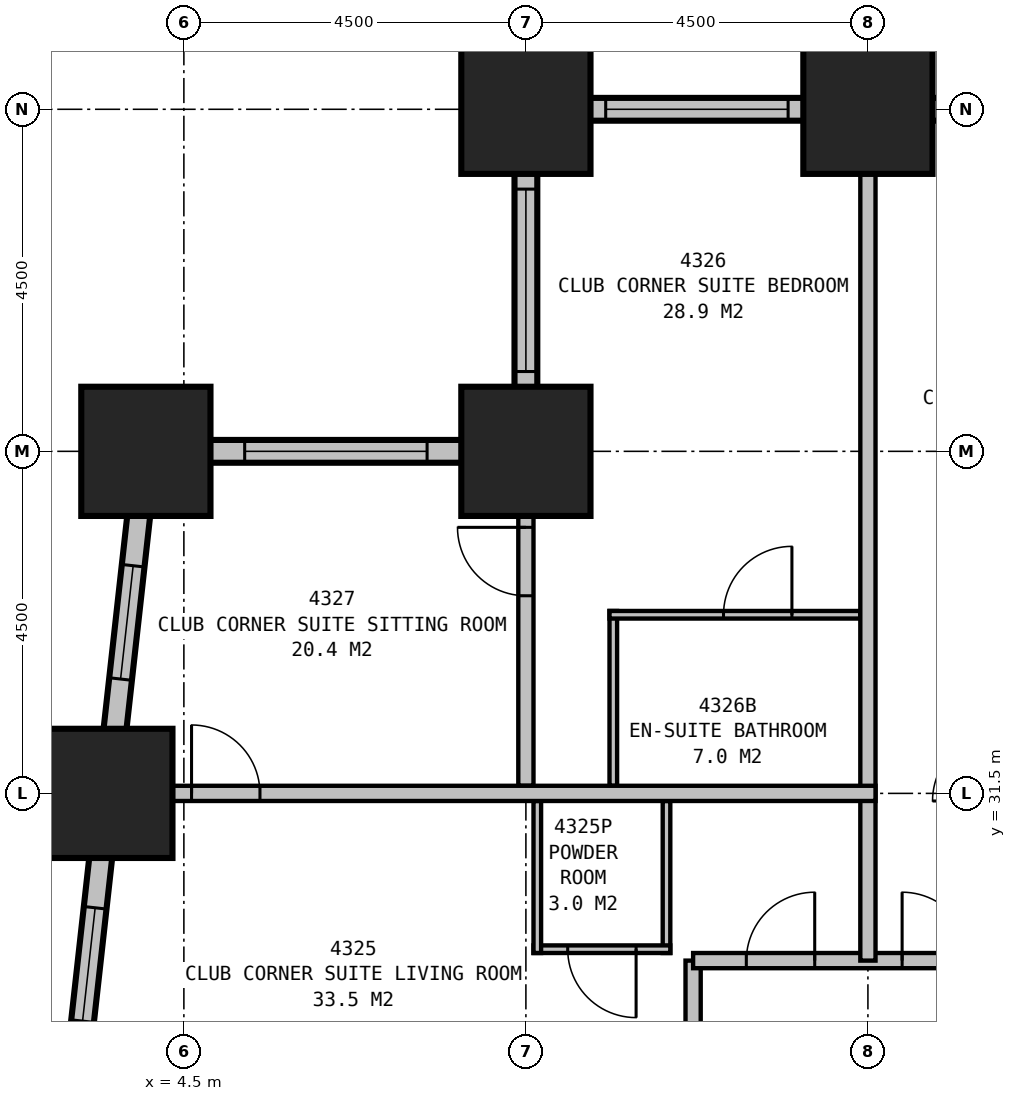
"""IFC4 building model, lengths in metres.
Left out: names, types, materials, properties, quantities, classifications, styles, units other than length and angle.
Written with IfcOpenShell. Run it as: python <this file> out.ifc"""

import sys

from ifc_helpers import new_model, si_unit, direction, frame, frame_2d, origin, origin_2d, place, context, subcontext, project, spatial, rectangle, extrude, element, fill, save


model = new_model("IFC4")
c1 = context("Model", 3, precision=1e-05, world=origin(), true_north=direction((0.0, 1.0)))
c2 = subcontext(c1, "Body", "Model", "MODEL_VIEW")
j1 = project(units=[si_unit("LENGTHUNIT", "METRE"), si_unit("PLANEANGLEUNIT", "RADIAN")], contexts=[c1])
p1 = place(None, origin())
s1 = spatial("IfcSite", under=j1, at=p1, CompositionType="ELEMENT")
p2 = place(p1, origin())
s2 = spatial("IfcBuilding", under=s1, at=p2, CompositionType="ELEMENT")
p3 = place(p2, frame((0.0, 0.0, 169.4)))
s3 = spatial("IfcBuildingStorey", under=s2, at=p3, CompositionType="ELEMENT", Elevation=169.4)
for number, where, z_axis, x_axis in (
    (1, (13.5, 40.5, 0.0), (0.0, 0.0, 1.0), (1.0, 0.0, 0.0)),
    (2, (9.0, 40.5, 0.0), (0.0, 0.0, 1.0), (1.0, 0.0, 0.0)),
    (3, (9.0, 36.0, 0.0), (0.0, 0.0, 1.0), (1.0, 0.0, 0.0)),
    (4, (4.0, 36.0, 0.0), (0.0, 0.0, 1.0), (1.0, 0.0, 0.0)),
    (5, (3.5, 31.5, 0.0), (0.0, 0.0, 1.0), (1.0, 0.0, 0.0)),
):
    element("IfcColumn", number, at=place(p3, frame(where, z_axis=z_axis, x_axis=x_axis)), inside=s3, PredefinedType="COLUMN", context=c2, shape_type="SweptSolid", body=[
        extrude(rectangle(XDim=1.7, YDim=1.7, at=origin_2d()), origin(), (0.0, 0.0, 1.0), 3.5),
    ])
p4 = place(p3, frame((40.65, 40.5, 0.0), z_axis=(0.0, 0.0, 1.0), x_axis=(-1.0, 0.0, 0.0)))
e6 = element("IfcWall", 6, at=p4, inside=s3, PredefinedType="STANDARD", context=c2, shape_type="SweptSolid", body=[
    extrude(rectangle(XDim=31.8, YDim=0.3, at=frame_2d((15.9, 0.0))), origin(), (0.0, 0.0, 1.0), 2.25),
])
p5 = place(p4, frame((1.2, 0.0, 0.5)))
e7 = element("IfcOpeningElement", 7, at=p5, cuts=e6, PredefinedType="OPENING", context=c2, shape_type="SweptSolid", body=[
    extrude(rectangle(XDim=2.4, YDim=1.6, at=frame_2d((1.2, 0.8))), frame((0.0, 0.16, 0.0), z_axis=(0.0, -1.0, 0.0), x_axis=(1.0, 0.0, 0.0)), (0.0, 0.0, 1.0), 0.32),
])
p6 = place(p4, frame((5.7, 0.0, 0.5)))
e8 = element("IfcOpeningElement", 8, at=p6, cuts=e6, PredefinedType="OPENING", context=c2, shape_type="SweptSolid", body=[
    extrude(rectangle(XDim=2.4, YDim=1.6, at=frame_2d((1.2, 0.8))), frame((0.0, 0.16, 0.0), z_axis=(0.0, -1.0, 0.0), x_axis=(1.0, 0.0, 0.0)), (0.0, 0.0, 1.0), 0.32),
])
p7 = place(p4, frame((10.2, 0.0, 0.5)))
e9 = element("IfcOpeningElement", 9, at=p7, cuts=e6, PredefinedType="OPENING", context=c2, shape_type="SweptSolid", body=[
    extrude(rectangle(XDim=2.4, YDim=1.6, at=frame_2d((1.2, 0.8))), frame((0.0, 0.16, 0.0), z_axis=(0.0, -1.0, 0.0), x_axis=(1.0, 0.0, 0.0)), (0.0, 0.0, 1.0), 0.32),
])
p8 = place(p4, frame((14.7, 0.0, 0.5)))
e10 = element("IfcOpeningElement", 10, at=p8, cuts=e6, PredefinedType="OPENING", context=c2, shape_type="SweptSolid", body=[
    extrude(rectangle(XDim=2.4, YDim=1.6, at=frame_2d((1.2, 0.8))), frame((0.0, 0.16, 0.0), z_axis=(0.0, -1.0, 0.0), x_axis=(1.0, 0.0, 0.0)), (0.0, 0.0, 1.0), 0.32),
])
p9 = place(p4, frame((19.2, 0.0, 0.5)))
e11 = element("IfcOpeningElement", 11, at=p9, cuts=e6, PredefinedType="OPENING", context=c2, shape_type="SweptSolid", body=[
    extrude(rectangle(XDim=2.4, YDim=1.6, at=frame_2d((1.2, 0.8))), frame((0.0, 0.16, 0.0), z_axis=(0.0, -1.0, 0.0), x_axis=(1.0, 0.0, 0.0)), (0.0, 0.0, 1.0), 0.32),
])
p10 = place(p4, frame((23.7, 0.0, 0.5)))
e12 = element("IfcOpeningElement", 12, at=p10, cuts=e6, PredefinedType="OPENING", context=c2, shape_type="SweptSolid", body=[
    extrude(rectangle(XDim=2.4, YDim=1.6, at=frame_2d((1.2, 0.8))), frame((0.0, 0.16, 0.0), z_axis=(0.0, -1.0, 0.0), x_axis=(1.0, 0.0, 0.0)), (0.0, 0.0, 1.0), 0.32),
])
p11 = place(p4, frame((28.2, 0.0, 0.5)))
e13 = element("IfcOpeningElement", 13, at=p11, cuts=e6, PredefinedType="OPENING", context=c2, shape_type="SweptSolid", body=[
    extrude(rectangle(XDim=2.4, YDim=1.6, at=frame_2d((1.2, 0.8))), frame((0.0, 0.16, 0.0), z_axis=(0.0, -1.0, 0.0), x_axis=(1.0, 0.0, 0.0)), (0.0, 0.0, 1.0), 0.32),
])
p12 = place(p3, frame((9.0, 40.65, 0.0), z_axis=(0.0, 0.0, 1.0), x_axis=(0.0, -1.0, 0.0)))
e14 = element("IfcWall", 14, at=p12, inside=s3, PredefinedType="STANDARD", context=c2, shape_type="SweptSolid", body=[
    extrude(rectangle(XDim=4.8, YDim=0.3, at=frame_2d((2.4, 0.0))), origin(), (0.0, 0.0, 1.0), 2.25),
])
p13 = place(p12, frame((1.2, 0.0, 0.5)))
e15 = element("IfcOpeningElement", 15, at=p13, cuts=e14, PredefinedType="OPENING", context=c2, shape_type="SweptSolid", body=[
    extrude(rectangle(XDim=2.4, YDim=1.6, at=frame_2d((1.2, 0.8))), frame((0.0, 0.16, 0.0), z_axis=(0.0, -1.0, 0.0), x_axis=(1.0, 0.0, 0.0)), (0.0, 0.0, 1.0), 0.32),
])
p14 = place(p3, frame((9.15, 36.0, 0.0), z_axis=(0.0, 0.0, 1.0), x_axis=(-1.0, 0.0, 0.0)))
e16 = element("IfcWall", 16, at=p14, inside=s3, PredefinedType="STANDARD", context=c2, shape_type="SweptSolid", body=[
    extrude(rectangle(XDim=5.3, YDim=0.3, at=frame_2d((2.65, 0.0))), origin(), (0.0, 0.0, 1.0), 2.25),
])
p15 = place(p14, frame((1.45, 0.0, 0.5)))
e17 = element("IfcOpeningElement", 17, at=p15, cuts=e16, PredefinedType="OPENING", context=c2, shape_type="SweptSolid", body=[
    extrude(rectangle(XDim=2.4, YDim=1.6, at=frame_2d((1.2, 0.8))), frame((0.0, 0.16, 0.0), z_axis=(0.0, -1.0, 0.0), x_axis=(1.0, 0.0, 0.0)), (0.0, 0.0, 1.0), 0.32),
])
p16 = place(p3, frame((4.017, 36.149, 0.0), z_axis=(0.0, 0.0, 1.0), x_axis=(-0.110433862387, -0.993883475081, 0.0)))
e18 = element("IfcWall", 18, at=p16, inside=s3, PredefinedType="STANDARD", context=c2, shape_type="SweptSolid", body=[
    extrude(rectangle(XDim=22.939, YDim=0.3, at=frame_2d((11.469, 0.0))), origin(), (0.0, 0.0, 1.0), 2.25),
])
p17 = place(p16, frame((1.664, 0.0, 0.5)))
e19 = element("IfcOpeningElement", 19, at=p17, cuts=e18, PredefinedType="OPENING", context=c2, shape_type="SweptSolid", body=[
    extrude(rectangle(XDim=1.5, YDim=1.6, at=frame_2d((0.75, 0.8))), frame((0.0, 0.16, 0.0), z_axis=(0.0, -1.0, 0.0), x_axis=(1.0, 0.0, 0.0)), (0.0, 0.0, 1.0), 0.32),
])
p18 = place(p16, frame((6.192, 0.0, 0.5)))
e20 = element("IfcOpeningElement", 20, at=p18, cuts=e18, PredefinedType="OPENING", context=c2, shape_type="SweptSolid", body=[
    extrude(rectangle(XDim=1.5, YDim=1.6, at=frame_2d((0.75, 0.8))), frame((0.0, 0.16, 0.0), z_axis=(0.0, -1.0, 0.0), x_axis=(1.0, 0.0, 0.0)), (0.0, 0.0, 1.0), 0.32),
])
p19 = place(p16, frame((10.719, 0.0, 0.5)))
e21 = element("IfcOpeningElement", 21, at=p19, cuts=e18, PredefinedType="OPENING", context=c2, shape_type="SweptSolid", body=[
    extrude(rectangle(XDim=1.5, YDim=1.6, at=frame_2d((0.75, 0.8))), frame((0.0, 0.16, 0.0), z_axis=(0.0, -1.0, 0.0), x_axis=(1.0, 0.0, 0.0)), (0.0, 0.0, 1.0), 0.32),
])
p20 = place(p16, frame((15.247, 0.0, 0.5)))
e22 = element("IfcOpeningElement", 22, at=p20, cuts=e18, PredefinedType="OPENING", context=c2, shape_type="SweptSolid", body=[
    extrude(rectangle(XDim=1.5, YDim=1.6, at=frame_2d((0.75, 0.8))), frame((0.0, 0.16, 0.0), z_axis=(0.0, -1.0, 0.0), x_axis=(1.0, 0.0, 0.0)), (0.0, 0.0, 1.0), 0.32),
])
p21 = place(p16, frame((19.775, 0.0, 0.5)))
e23 = element("IfcOpeningElement", 23, at=p21, cuts=e18, PredefinedType="OPENING", context=c2, shape_type="SweptSolid", body=[
    extrude(rectangle(XDim=1.5, YDim=1.6, at=frame_2d((0.75, 0.8))), frame((0.0, 0.16, 0.0), z_axis=(0.0, -1.0, 0.0), x_axis=(1.0, 0.0, 0.0)), (0.0, 0.0, 1.0), 0.32),
])
p22 = place(p3, frame((11.2, 29.3, 0.0), z_axis=(0.0, 0.0, 1.0), x_axis=(1.0, 0.0, 0.0)))
e24 = element("IfcWall", 24, at=p22, inside=s3, PredefinedType="PARTITIONING", context=c2, shape_type="SweptSolid", body=[
    extrude(rectangle(XDim=27.1, YDim=0.2, at=frame_2d((13.55, 0.0))), origin(), (0.0, 0.0, 1.0), 3.25),
])
p23 = place(p22, frame((2.75, 0.0, 0.0)))
e25 = element("IfcOpeningElement", 25, at=p23, cuts=e24, PredefinedType="OPENING", context=c2, shape_type="SweptSolid", body=[
    extrude(rectangle(XDim=0.9, YDim=2.1, at=frame_2d((0.45, 1.05))), frame((0.0, 0.11, 0.0), z_axis=(0.0, -1.0, 0.0), x_axis=(1.0, 0.0, 0.0)), (0.0, 0.0, 1.0), 0.22),
])
p24 = place(p22, frame((9.55, 0.0, 0.0)))
e26 = element("IfcOpeningElement", 26, at=p24, cuts=e24, PredefinedType="OPENING", context=c2, shape_type="SweptSolid", body=[
    extrude(rectangle(XDim=0.9, YDim=2.1, at=frame_2d((0.45, 1.05))), frame((0.0, 0.11, 0.0), z_axis=(0.0, -1.0, 0.0), x_axis=(1.0, 0.0, 0.0)), (0.0, 0.0, 1.0), 0.22),
])
p25 = place(p22, frame((16.25, 0.0, 0.0)))
e27 = element("IfcOpeningElement", 27, at=p25, cuts=e24, PredefinedType="OPENING", context=c2, shape_type="SweptSolid", body=[
    extrude(rectangle(XDim=0.9, YDim=2.1, at=frame_2d((0.45, 1.05))), frame((0.0, 0.11, 0.0), z_axis=(0.0, -1.0, 0.0), x_axis=(1.0, 0.0, 0.0)), (0.0, 0.0, 1.0), 0.22),
])
p26 = place(p22, frame((20.75, 0.0, 0.0)))
e28 = element("IfcOpeningElement", 28, at=p26, cuts=e24, PredefinedType="OPENING", context=c2, shape_type="SweptSolid", body=[
    extrude(rectangle(XDim=0.9, YDim=2.1, at=frame_2d((0.45, 1.05))), frame((0.0, 0.11, 0.0), z_axis=(0.0, -1.0, 0.0), x_axis=(1.0, 0.0, 0.0)), (0.0, 0.0, 1.0), 0.22),
])
p27 = place(p22, frame((25.5, 0.0, 0.0)))
e29 = element("IfcOpeningElement", 29, at=p27, cuts=e24, PredefinedType="OPENING", context=c2, shape_type="SweptSolid", body=[
    extrude(rectangle(XDim=0.9, YDim=2.1, at=frame_2d((0.45, 1.05))), frame((0.0, 0.11, 0.0), z_axis=(0.0, -1.0, 0.0), x_axis=(1.0, 0.0, 0.0)), (0.0, 0.0, 1.0), 0.22),
])
p28 = place(p22, frame((0.7, 0.0, 0.0)))
e30 = element("IfcOpeningElement", 30, at=p28, cuts=e24, PredefinedType="OPENING", context=c2, shape_type="SweptSolid", body=[
    extrude(rectangle(XDim=0.9, YDim=2.1, at=frame_2d((0.45, 1.05))), frame((0.0, 0.11, 0.0), z_axis=(0.0, -1.0, 0.0), x_axis=(1.0, 0.0, 0.0)), (0.0, 0.0, 1.0), 0.22),
])
p29 = place(p3, frame((11.2, 10.6, 0.0), z_axis=(0.0, 0.0, 1.0), x_axis=(0.0, 1.0, 0.0)))
e31 = element("IfcWall", 31, at=p29, inside=s3, PredefinedType="PARTITIONING", context=c2, shape_type="SweptSolid", body=[
    extrude(rectangle(XDim=18.7, YDim=0.2, at=frame_2d((9.35, 0.0))), origin(), (0.0, 0.0, 1.0), 3.25),
])
p30 = place(p29, frame((6.05, 0.0, 0.0)))
e32 = element("IfcOpeningElement", 32, at=p30, cuts=e31, PredefinedType="OPENING", context=c2, shape_type="SweptSolid", body=[
    extrude(rectangle(XDim=0.9, YDim=2.1, at=frame_2d((0.45, 1.05))), frame((0.0, 0.11, 0.0), z_axis=(0.0, -1.0, 0.0), x_axis=(1.0, 0.0, 0.0)), (0.0, 0.0, 1.0), 0.22),
])
p31 = place(p29, frame((10.55, 0.0, 0.0)))
e33 = element("IfcOpeningElement", 33, at=p31, cuts=e31, PredefinedType="OPENING", context=c2, shape_type="SweptSolid", body=[
    extrude(rectangle(XDim=0.9, YDim=2.1, at=frame_2d((0.45, 1.05))), frame((0.0, 0.11, 0.0), z_axis=(0.0, -1.0, 0.0), x_axis=(1.0, 0.0, 0.0)), (0.0, 0.0, 1.0), 0.22),
])
p32 = place(p29, frame((14.65, 0.0, 0.0)))
e34 = element("IfcOpeningElement", 34, at=p32, cuts=e31, PredefinedType="OPENING", context=c2, shape_type="SweptSolid", body=[
    extrude(rectangle(XDim=1.0, YDim=2.1, at=frame_2d((0.5, 1.05))), frame((0.0, 0.11, 0.0), z_axis=(0.0, -1.0, 0.0), x_axis=(1.0, 0.0, 0.0)), (0.0, 0.0, 1.0), 0.22),
])
p33 = place(p3, frame((13.5, 29.3, 0.0), z_axis=(0.0, 0.0, 1.0), x_axis=(0.0, 1.0, 0.0)))
e35 = element("IfcWall", 35, at=p33, inside=s3, PredefinedType="PARTITIONING", context=c2, shape_type="SweptSolid", body=[
    extrude(rectangle(XDim=11.2, YDim=0.2, at=frame_2d((5.6, 0.0))), origin(), (0.0, 0.0, 1.0), 2.25),
])
p34 = place(p3, frame((13.6, 31.5, 0.0), z_axis=(0.0, 0.0, 1.0), x_axis=(-1.0, 0.0, 0.0)))
e36 = element("IfcWall", 36, at=p34, inside=s3, PredefinedType="PARTITIONING", context=c2, shape_type="SweptSolid", body=[
    extrude(rectangle(XDim=10.099, YDim=0.2, at=frame_2d((5.05, 0.0))), origin(), (0.0, 0.0, 1.0), 3.25),
])
p35 = place(p34, frame((8.999, 0.0, 0.0), z_axis=(0.0, 0.0, 1.0), x_axis=(-1.0, 0.0, 0.0)))
e37 = element("IfcOpeningElement", 37, at=p35, cuts=e36, PredefinedType="OPENING", context=c2, shape_type="SweptSolid", body=[
    extrude(rectangle(XDim=0.9, YDim=2.1, at=frame_2d((0.45, 1.05))), frame((0.0, 0.11, 0.0), z_axis=(0.0, -1.0, 0.0), x_axis=(1.0, 0.0, 0.0)), (0.0, 0.0, 1.0), 0.22),
])
p36 = place(p3, frame((9.15, 31.4, 0.0), z_axis=(0.0, 0.0, 1.0), x_axis=(0.0, -1.0, 0.0)))
e38 = element("IfcWall", 38, at=p36, inside=s3, PredefinedType="PLUMBINGWALL", context=c2, shape_type="SweptSolid", body=[
    extrude(rectangle(XDim=2.0, YDim=0.1, at=frame_2d((1.0, 0.0))), origin(), (0.0, 0.0, 1.0), 2.25),
])
p37 = place(p3, frame((10.85, 31.4, 0.0), z_axis=(0.0, 0.0, 1.0), x_axis=(0.0, -1.0, 0.0)))
e39 = element("IfcWall", 39, at=p37, inside=s3, PredefinedType="PLUMBINGWALL", context=c2, shape_type="SweptSolid", body=[
    extrude(rectangle(XDim=2.0, YDim=0.1, at=frame_2d((1.0, 0.0))), origin(), (0.0, 0.0, 1.0), 3.25),
])
p38 = place(p3, frame((10.9, 29.45, 0.0), z_axis=(0.0, 0.0, 1.0), x_axis=(-1.0, 0.0, 0.0)))
e40 = element("IfcWall", 40, at=p38, inside=s3, PredefinedType="PLUMBINGWALL", context=c2, shape_type="SweptSolid", body=[
    extrude(rectangle(XDim=1.8, YDim=0.1, at=frame_2d((0.9, 0.0))), origin(), (0.0, 0.0, 1.0), 3.25),
])
p39 = place(p38, frame((0.45, 0.0, 0.0)))
e41 = element("IfcOpeningElement", 41, at=p39, cuts=e40, PredefinedType="OPENING", context=c2, shape_type="SweptSolid", body=[
    extrude(rectangle(XDim=0.9, YDim=2.1, at=frame_2d((0.45, 1.05))), frame((0.0, 0.06, 0.0), z_axis=(0.0, -1.0, 0.0), x_axis=(1.0, 0.0, 0.0)), (0.0, 0.0, 1.0), 0.12),
])
p40 = place(p3, frame((9.0, 31.6, 0.0), z_axis=(0.0, 0.0, 1.0), x_axis=(0.0, 1.0, 0.0)))
e42 = element("IfcWall", 42, at=p40, inside=s3, PredefinedType="PARTITIONING", context=c2, shape_type="SweptSolid", body=[
    extrude(rectangle(XDim=4.4, YDim=0.2, at=frame_2d((2.2, 0.0))), origin(), (0.0, 0.0, 1.0), 2.25),
])
p41 = place(p40, frame((2.5, 0.0, 0.0)))
e43 = element("IfcOpeningElement", 43, at=p41, cuts=e42, PredefinedType="OPENING", context=c2, shape_type="SweptSolid", body=[
    extrude(rectangle(XDim=0.9, YDim=2.1, at=frame_2d((0.45, 1.05))), frame((0.0, 0.11, 0.0), z_axis=(0.0, -1.0, 0.0), x_axis=(1.0, 0.0, 0.0)), (0.0, 0.0, 1.0), 0.22),
])
p42 = place(p3, frame((10.15, 31.6, 0.0), z_axis=(0.0, 0.0, 1.0), x_axis=(0.0, 1.0, 0.0)))
e44 = element("IfcWall", 44, at=p42, inside=s3, PredefinedType="PLUMBINGWALL", context=c2, shape_type="SweptSolid", body=[
    extrude(rectangle(XDim=2.3, YDim=0.1, at=frame_2d((1.15, 0.0))), origin(), (0.0, 0.0, 1.0), 3.25),
])
p43 = place(p3, frame((13.4, 33.85, 0.0), z_axis=(0.0, 0.0, 1.0), x_axis=(-1.0, 0.0, 0.0)))
e45 = element("IfcWall", 45, at=p43, inside=s3, PredefinedType="PLUMBINGWALL", context=c2, shape_type="SweptSolid", body=[
    extrude(rectangle(XDim=3.3, YDim=0.1, at=frame_2d((1.65, 0.0))), origin(), (0.0, 0.0, 1.0), 3.25),
])
p44 = place(p43, frame((1.8, 0.0, 0.0), z_axis=(0.0, 0.0, 1.0), x_axis=(-1.0, 0.0, 0.0)))
e46 = element("IfcOpeningElement", 46, at=p44, cuts=e45, PredefinedType="OPENING", context=c2, shape_type="SweptSolid", body=[
    extrude(rectangle(XDim=0.9, YDim=2.1, at=frame_2d((0.45, 1.05))), frame((0.0, 0.06, 0.0), z_axis=(0.0, -1.0, 0.0), x_axis=(1.0, 0.0, 0.0)), (0.0, 0.0, 1.0), 0.12),
])
p45 = place(p11, origin())
e47 = element("IfcWindow", 47, at=p45, inside=s3, PartitioningType="SINGLE_PANEL", PredefinedType="WINDOW", context=c2, shape_type="SweptSolid", body=[
    extrude(rectangle(XDim=2.4, YDim=1.6, at=frame_2d((1.2, 0.8))), frame((0.0, 0.03, 0.0), z_axis=(0.0, -1.0, 0.0), x_axis=(1.0, 0.0, 0.0)), (0.0, 0.0, 1.0), 0.06),
])
fill(e13, e47)
p46 = place(p13, origin())
e48 = element("IfcWindow", 48, at=p46, inside=s3, PartitioningType="SINGLE_PANEL", PredefinedType="WINDOW", context=c2, shape_type="SweptSolid", body=[
    extrude(rectangle(XDim=2.4, YDim=1.6, at=frame_2d((1.2, 0.8))), frame((0.0, 0.03, 0.0), z_axis=(0.0, -1.0, 0.0), x_axis=(1.0, 0.0, 0.0)), (0.0, 0.0, 1.0), 0.06),
])
fill(e15, e48)
p47 = place(p15, origin())
e49 = element("IfcWindow", 49, at=p47, inside=s3, PartitioningType="SINGLE_PANEL", PredefinedType="WINDOW", context=c2, shape_type="SweptSolid", body=[
    extrude(rectangle(XDim=2.4, YDim=1.6, at=frame_2d((1.2, 0.8))), frame((0.0, 0.03, 0.0), z_axis=(0.0, -1.0, 0.0), x_axis=(1.0, 0.0, 0.0)), (0.0, 0.0, 1.0), 0.06),
])
fill(e17, e49)
p48 = place(p17, origin())
e50 = element("IfcWindow", 50, at=p48, inside=s3, PartitioningType="SINGLE_PANEL", PredefinedType="WINDOW", context=c2, shape_type="SweptSolid", body=[
    extrude(rectangle(XDim=1.5, YDim=1.6, at=frame_2d((0.75, 0.8))), frame((0.0, 0.03, 0.0), z_axis=(0.0, -1.0, 0.0), x_axis=(1.0, 0.0, 0.0)), (0.0, 0.0, 1.0), 0.06),
])
fill(e19, e50)
p49 = place(p18, origin())
e51 = element("IfcWindow", 51, at=p49, inside=s3, PartitioningType="SINGLE_PANEL", PredefinedType="WINDOW", context=c2, shape_type="SweptSolid", body=[
    extrude(rectangle(XDim=1.5, YDim=1.6, at=frame_2d((0.75, 0.8))), frame((0.0, 0.03, 0.0), z_axis=(0.0, -1.0, 0.0), x_axis=(1.0, 0.0, 0.0)), (0.0, 0.0, 1.0), 0.06),
])
fill(e20, e51)
p50 = place(p23, origin())
e52 = element("IfcDoor", 52, at=p50, inside=s3, OperationType="SINGLE_SWING_LEFT", PredefinedType="DOOR", context=c2, shape_type="SweptSolid", body=[
    extrude(rectangle(XDim=0.9, YDim=2.1, at=frame_2d((0.45, 1.05))), frame((0.0, 0.025, 0.0), z_axis=(0.0, -1.0, 0.0), x_axis=(1.0, 0.0, 0.0)), (0.0, 0.0, 1.0), 0.05),
])
fill(e25, e52)
p51 = place(p28, origin())
e53 = element("IfcDoor", 53, at=p51, inside=s3, OperationType="SINGLE_SWING_RIGHT", PredefinedType="DOOR", context=c2, shape_type="SweptSolid", body=[
    extrude(rectangle(XDim=0.9, YDim=2.1, at=frame_2d((0.45, 1.05))), frame((0.0, 0.025, 0.0), z_axis=(0.0, -1.0, 0.0), x_axis=(1.0, 0.0, 0.0)), (0.0, 0.0, 1.0), 0.05),
])
fill(e30, e53)
p52 = place(p35, origin())
e54 = element("IfcDoor", 54, at=p52, inside=s3, OperationType="SINGLE_SWING_LEFT", PredefinedType="DOOR", context=c2, shape_type="SweptSolid", body=[
    extrude(rectangle(XDim=0.9, YDim=2.1, at=frame_2d((0.45, 1.05))), frame((0.0, 0.025, 0.0), z_axis=(0.0, -1.0, 0.0), x_axis=(1.0, 0.0, 0.0)), (0.0, 0.0, 1.0), 0.05),
])
fill(e37, e54)
p53 = place(p39, origin())
e55 = element("IfcDoor", 55, at=p53, inside=s3, OperationType="SINGLE_SWING_LEFT", PredefinedType="DOOR", context=c2, shape_type="SweptSolid", body=[
    extrude(rectangle(XDim=0.9, YDim=2.1, at=frame_2d((0.45, 1.05))), frame((0.0, 0.025, 0.0), z_axis=(0.0, -1.0, 0.0), x_axis=(1.0, 0.0, 0.0)), (0.0, 0.0, 1.0), 0.05),
])
fill(e41, e55)
p54 = place(p41, origin())
e56 = element("IfcDoor", 56, at=p54, inside=s3, OperationType="SINGLE_SWING_RIGHT", PredefinedType="DOOR", context=c2, shape_type="SweptSolid", body=[
    extrude(rectangle(XDim=0.9, YDim=2.1, at=frame_2d((0.45, 1.05))), frame((0.0, 0.025, 0.0), z_axis=(0.0, -1.0, 0.0), x_axis=(1.0, 0.0, 0.0)), (0.0, 0.0, 1.0), 0.05),
])
fill(e43, e56)
p55 = place(p44, origin())
e57 = element("IfcDoor", 57, at=p55, inside=s3, OperationType="SINGLE_SWING_RIGHT", PredefinedType="DOOR", context=c2, shape_type="SweptSolid", body=[
    extrude(rectangle(XDim=0.9, YDim=2.1, at=frame_2d((0.45, 1.05))), frame((0.0, 0.025, 0.0), z_axis=(0.0, -1.0, 0.0), x_axis=(1.0, 0.0, 0.0)), (0.0, 0.0, 1.0), 0.05),
])
fill(e46, e57)
save(model, sys.argv[1])
